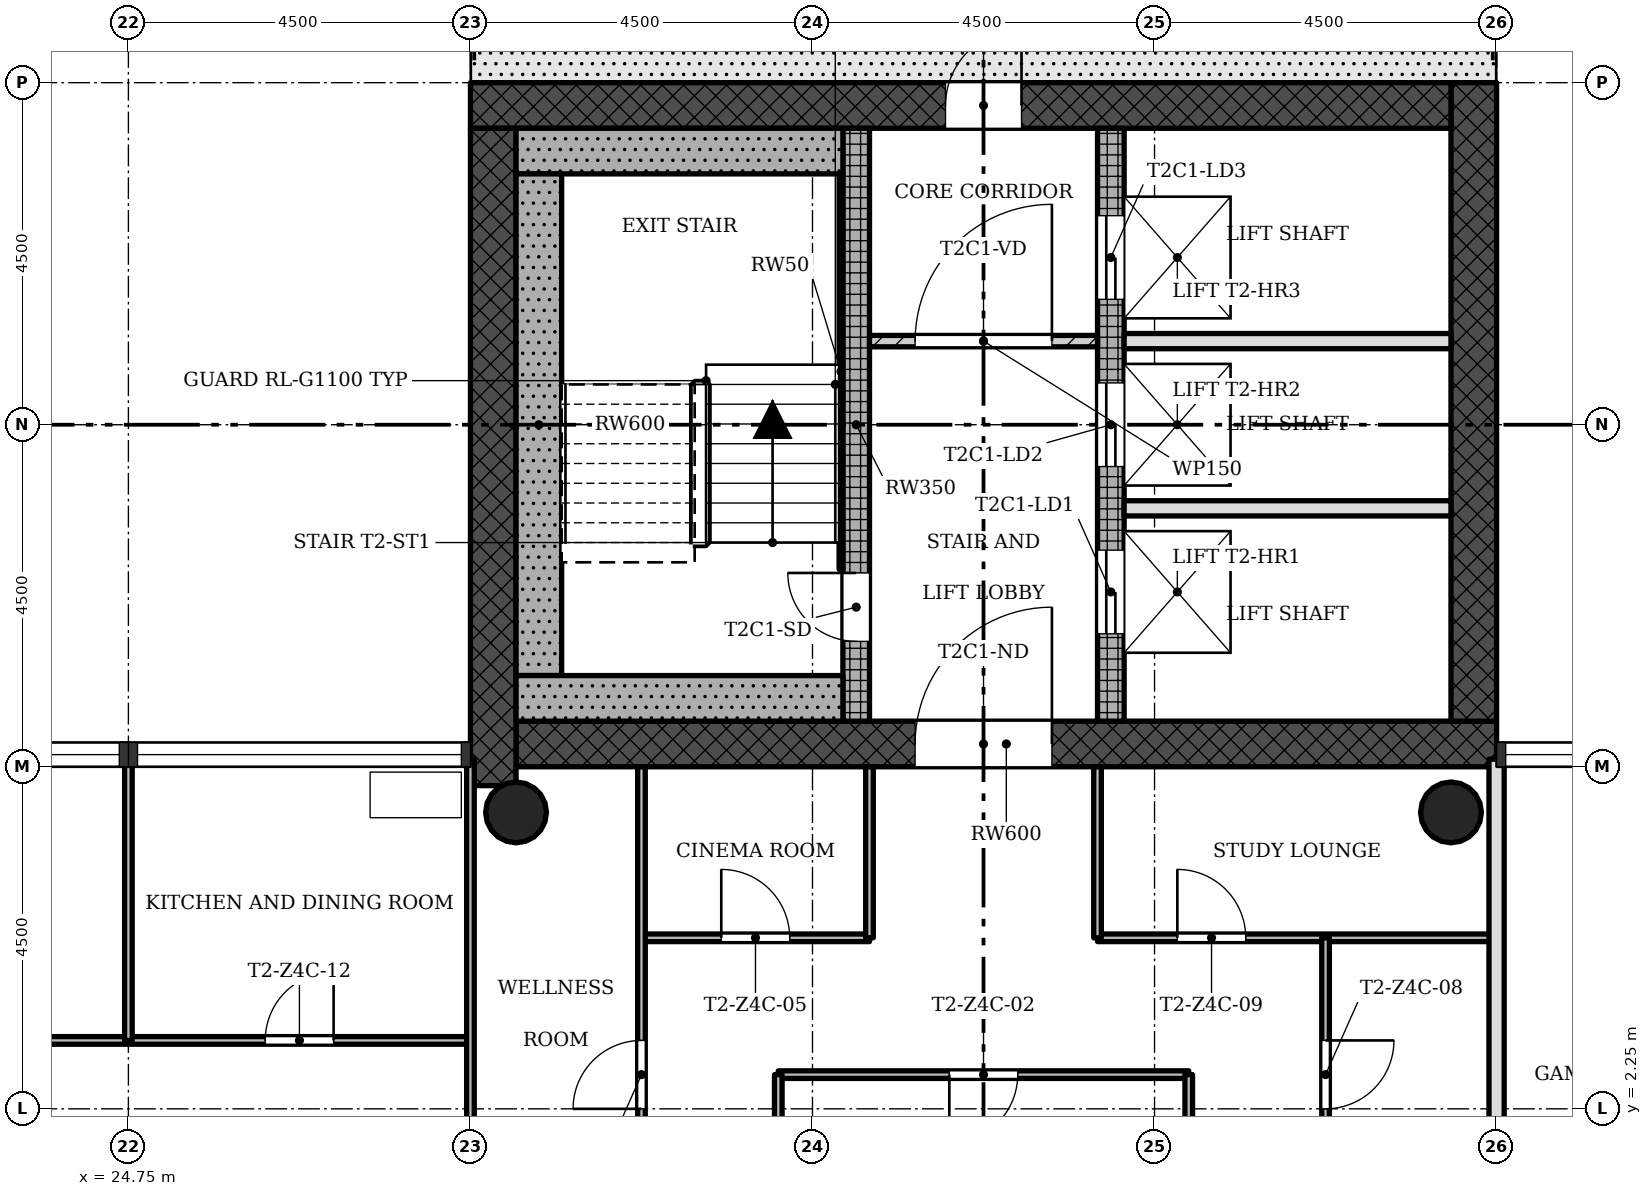
"""IFC4 building model, lengths in metres.
Left out: names, types, materials, properties, quantities, classifications, styles, units other than length and angle.
Written with IfcOpenShell. Run it as: python <this file> out.ifc"""

import sys

from ifc_helpers import new_model, si_unit, direction, frame, frame_2d, origin, origin_2d, place, context, subcontext, project, spatial, rectangle, hollow_circle, extrude, element, fill, save


model = new_model("IFC4")
c1 = context("Model", 3, precision=1e-05, world=origin(), true_north=direction((0.0, 1.0)))
c2 = subcontext(c1, "Body", "Model", "MODEL_VIEW")
j1 = project(units=[si_unit("LENGTHUNIT", "METRE"), si_unit("PLANEANGLEUNIT", "RADIAN")], contexts=[c1])
p1 = place(None, origin())
s1 = spatial("IfcSite", under=j1, at=p1, CompositionType="ELEMENT")
p2 = place(p1, origin())
s2 = spatial("IfcBuilding", under=s1, at=p2, CompositionType="ELEMENT")
p3 = place(p2, frame((0.0, 0.0, 185.8)))
s3 = spatial("IfcBuildingStorey", under=s2, at=p3, CompositionType="ELEMENT", Elevation=185.8)
p4 = place(p3, frame((29.85, 7.05, 0.0), z_axis=(0.0, 0.0, 1.0), x_axis=(1.0, 0.0, 0.0)))
e1 = element("IfcWall", 1, at=p4, inside=s3, PredefinedType="SHEAR", context=c2, shape_type="SweptSolid", body=[
    extrude(rectangle(XDim=12.9, YDim=0.6, at=frame_2d((6.45, 0.0))), origin(), (0.0, 0.0, 1.0), 3.4),
])
p5 = place(p4, frame((5.25, 0.0, 0.0)))
e2 = element("IfcOpeningElement", 2, at=p5, cuts=e1, PredefinedType="OPENING", context=c2, shape_type="SweptSolid", body=[
    extrude(rectangle(XDim=1.8, YDim=2.1, at=frame_2d((0.9, 1.05))), frame((0.0, 0.31, 0.0), z_axis=(0.0, -1.0, 0.0), x_axis=(1.0, 0.0, 0.0)), (0.0, 0.0, 1.0), 0.62),
])
p6 = place(p3, frame((42.45, 7.35, 0.0), z_axis=(0.0, 0.0, 1.0), x_axis=(0.0, 1.0, 0.0)))
e3 = element("IfcWall", 3, at=p6, inside=s3, PredefinedType="SHEAR", context=c2, shape_type="SweptSolid", body=[
    extrude(rectangle(XDim=8.4, YDim=0.6, at=frame_2d((4.2, 0.0))), origin(), (0.0, 0.0, 1.0), 3.4),
])
p7 = place(p3, frame((42.15, 15.45, 0.0), z_axis=(0.0, 0.0, 1.0), x_axis=(-1.0, 0.0, 0.0)))
e4 = element("IfcWall", 4, at=p7, inside=s3, PredefinedType="SHEAR", context=c2, shape_type="SweptSolid", body=[
    extrude(rectangle(XDim=12.9, YDim=0.6, at=frame_2d((6.45, 0.0))), origin(), (0.0, 0.0, 1.0), 3.4),
])
p8 = place(p7, frame((5.65, 0.0, 0.0)))
e5 = element("IfcOpeningElement", 5, at=p8, cuts=e4, PredefinedType="OPENING", context=c2, shape_type="SweptSolid", body=[
    extrude(rectangle(XDim=1.0, YDim=2.1, at=frame_2d((0.5, 1.05))), frame((0.0, 0.31, 0.0), z_axis=(0.0, -1.0, 0.0), x_axis=(1.0, 0.0, 0.0)), (0.0, 0.0, 1.0), 0.62),
])
p9 = place(p3, frame((29.55, 15.15, 0.0), z_axis=(0.0, 0.0, 1.0), x_axis=(0.0, -1.0, 0.0)))
e6 = element("IfcWall", 6, at=p9, inside=s3, PredefinedType="SHEAR", context=c2, shape_type="SweptSolid", body=[
    extrude(rectangle(XDim=8.648, YDim=0.6, at=frame_2d((4.324, 0.0))), origin(), (0.0, 0.0, 1.0), 3.4),
])
p10 = place(p3, frame((34.325, 7.35, 0.0), z_axis=(0.0, 0.0, 1.0), x_axis=(0.0, 1.0, 0.0)))
e7 = element("IfcWall", 7, at=p10, inside=s3, PredefinedType="SHEAR", context=c2, shape_type="SweptSolid", body=[
    extrude(rectangle(XDim=7.8, YDim=0.35, at=frame_2d((3.9, 0.0))), origin(), (0.0, 0.0, 1.0), 3.4),
])
p11 = place(p10, frame((1.05, 0.0, 0.0)))
e8 = element("IfcOpeningElement", 8, at=p11, cuts=e7, PredefinedType="OPENING", context=c2, shape_type="SweptSolid", body=[
    extrude(rectangle(XDim=0.9, YDim=2.1, at=frame_2d((0.45, 1.05))), frame((0.0, 0.185, 0.0), z_axis=(0.0, -1.0, 0.0), x_axis=(1.0, 0.0, 0.0)), (0.0, 0.0, 1.0), 0.37),
])
p12 = place(p3, frame((37.675, 7.35, 0.0), z_axis=(0.0, 0.0, 1.0), x_axis=(0.0, 1.0, 0.0)))
e9 = element("IfcWall", 9, at=p12, inside=s3, PredefinedType="SHEAR", context=c2, shape_type="SweptSolid", body=[
    extrude(rectangle(XDim=7.8, YDim=0.35, at=frame_2d((3.9, 0.0))), origin(), (0.0, 0.0, 1.0), 3.4),
])
p13 = place(p12, frame((1.15, 0.0, 0.0)))
e10 = element("IfcOpeningElement", 10, at=p13, cuts=e9, PredefinedType="OPENING", context=c2, shape_type="SweptSolid", body=[
    extrude(rectangle(XDim=1.1, YDim=2.1, at=frame_2d((0.55, 1.05))), frame((0.0, 0.185, 0.0), z_axis=(0.0, -1.0, 0.0), x_axis=(1.0, 0.0, 0.0)), (0.0, 0.0, 1.0), 0.37),
])
p14 = place(p12, frame((3.35, 0.0, 0.0)))
e11 = element("IfcOpeningElement", 11, at=p14, cuts=e9, PredefinedType="OPENING", context=c2, shape_type="SweptSolid", body=[
    extrude(rectangle(XDim=1.1, YDim=2.1, at=frame_2d((0.55, 1.05))), frame((0.0, 0.185, 0.0), z_axis=(0.0, -1.0, 0.0), x_axis=(1.0, 0.0, 0.0)), (0.0, 0.0, 1.0), 0.37),
])
p15 = place(p12, frame((5.55, 0.0, 0.0)))
e12 = element("IfcOpeningElement", 12, at=p15, cuts=e9, PredefinedType="OPENING", context=c2, shape_type="SweptSolid", body=[
    extrude(rectangle(XDim=1.1, YDim=2.1, at=frame_2d((0.55, 1.05))), frame((0.0, 0.185, 0.0), z_axis=(0.0, -1.0, 0.0), x_axis=(1.0, 0.0, 0.0)), (0.0, 0.0, 1.0), 0.37),
])
for number, where, z_axis, x_axis in (
    (13, (42.15, 6.15, 0.0), (0.0, 0.0, 1.0), (1.0, 0.0, 0.0)),
    (14, (29.85, 6.15, 0.0), (0.0, 0.0, 1.0), (1.0, 0.0, 0.0)),
):
    element("IfcColumn", number, at=place(p3, frame(where, z_axis=z_axis, x_axis=x_axis)), inside=s3, PredefinedType="COLUMN", context=c2, shape_type="SweptSolid", body=[
        extrude(hollow_circle(Radius=0.4, WallThickness=0.028, at=origin_2d()), origin(), (0.0, 0.0, 1.0), 3.4),
    ])
p16 = place(p3, frame((37.5, 12.35, 0.0), z_axis=(0.0, 0.0, 1.0), x_axis=(-1.0, 0.0, 0.0)))
e15 = element("IfcWall", 15, at=p16, inside=s3, PredefinedType="PARTITIONING", context=c2, shape_type="SweptSolid", body=[
    extrude(rectangle(XDim=3.0, YDim=0.15, at=frame_2d((1.5, 0.0))), origin(), (0.0, 0.0, 1.0), 3.0),
])
p17 = place(p16, frame((0.6, 0.0, 0.0)))
e16 = element("IfcOpeningElement", 16, at=p17, cuts=e15, PredefinedType="OPENING", context=c2, shape_type="SweptSolid", body=[
    extrude(rectangle(XDim=1.8, YDim=2.1, at=frame_2d((0.9, 1.05))), frame((0.0, 0.085, 0.0), z_axis=(0.0, -1.0, 0.0), x_axis=(1.0, 0.0, 0.0)), (0.0, 0.0, 1.0), 0.17),
])
for number, where, z_axis, x_axis in (
    (17, (42.15, 10.15, 0.0), (0.0, 0.0, 1.0), (-1.0, 0.0, 0.0)),
    (18, (42.15, 12.35, 0.0), (0.0, 0.0, 1.0), (-1.0, 0.0, 0.0)),
):
    element("IfcWall", number, at=place(p3, frame(where, z_axis=z_axis, x_axis=x_axis)), inside=s3, PredefinedType="SOLIDWALL", context=c2, shape_type="SweptSolid", body=[
        extrude(rectangle(XDim=4.3, YDim=0.2, at=frame_2d((2.15, 0.0))), origin(), (0.0, 0.0, 1.0), 3.0),
    ])
p18 = place(p3, frame((38.7, 2.7, 0.0), z_axis=(0.0, 0.0, 1.0), x_axis=(-1.0, 0.0, 0.0)))
e19 = element("IfcWall", 19, at=p18, inside=s3, PredefinedType="PARTITIONING", context=c2, shape_type="SweptSolid", body=[
    extrude(rectangle(XDim=5.4, YDim=0.1, at=frame_2d((2.7, 0.0))), origin(), (0.0, 0.0, 1.0), 3.0),
])
p19 = place(p18, frame((2.25, 0.0, 0.0)))
e20 = element("IfcOpeningElement", 20, at=p19, cuts=e19, PredefinedType="OPENING", context=c2, shape_type="SweptSolid", body=[
    extrude(rectangle(XDim=0.9, YDim=2.1, at=frame_2d((0.45, 1.05))), frame((0.0, 0.06, 0.0), z_axis=(0.0, -1.0, 0.0), x_axis=(1.0, 0.0, 0.0)), (0.0, 0.0, 1.0), 0.12),
])
p20 = place(p3, frame((29.25, 3.15, 0.0), z_axis=(0.0, 0.0, 1.0), x_axis=(-1.0, 0.0, 0.0)))
e21 = element("IfcWall", 21, at=p20, inside=s3, PredefinedType="PARTITIONING", context=c2, shape_type="SweptSolid", body=[
    extrude(rectangle(XDim=9.0, YDim=0.1, at=frame_2d((4.5, 0.0))), origin(), (0.0, 0.0, 1.0), 3.0),
])
p21 = place(p20, frame((1.8, 0.0, 0.0)))
e22 = element("IfcOpeningElement", 22, at=p21, cuts=e21, PredefinedType="OPENING", context=c2, shape_type="SweptSolid", body=[
    extrude(rectangle(XDim=0.9, YDim=2.1, at=frame_2d((0.45, 1.05))), frame((0.0, 0.06, 0.0), z_axis=(0.0, -1.0, 0.0), x_axis=(1.0, 0.0, 0.0)), (0.0, 0.0, 1.0), 0.12),
])
p22 = place(p20, frame((6.3, 0.0, 0.0)))
e23 = element("IfcOpeningElement", 23, at=p22, cuts=e21, PredefinedType="OPENING", context=c2, shape_type="SweptSolid", body=[
    extrude(rectangle(XDim=0.9, YDim=2.1, at=frame_2d((0.45, 1.05))), frame((0.0, 0.06, 0.0), z_axis=(0.0, -1.0, 0.0), x_axis=(1.0, 0.0, 0.0)), (0.0, 0.0, 1.0), 0.12),
])
p23 = place(p3, frame((42.75, 4.5, 0.0), z_axis=(0.0, 0.0, 1.0), x_axis=(-1.0, 0.0, 0.0)))
e24 = element("IfcWall", 24, at=p23, inside=s3, PredefinedType="PARTITIONING", context=c2, shape_type="SweptSolid", body=[
    extrude(rectangle(XDim=5.25, YDim=0.1, at=frame_2d((2.625, 0.0))), origin(), (0.0, 0.0, 1.0), 3.0),
])
p24 = place(p23, frame((3.3, 0.0, 0.0)))
e25 = element("IfcOpeningElement", 25, at=p24, cuts=e24, PredefinedType="OPENING", context=c2, shape_type="SweptSolid", body=[
    extrude(rectangle(XDim=0.9, YDim=2.1, at=frame_2d((0.45, 1.05))), frame((0.0, 0.06, 0.0), z_axis=(0.0, -1.0, 0.0), x_axis=(1.0, 0.0, 0.0)), (0.0, 0.0, 1.0), 0.12),
])
p25 = place(p3, frame((34.5, 4.5, 0.0), z_axis=(0.0, 0.0, 1.0), x_axis=(-1.0, 0.0, 0.0)))
e26 = element("IfcWall", 26, at=p25, inside=s3, PredefinedType="PARTITIONING", context=c2, shape_type="SweptSolid", body=[
    extrude(rectangle(XDim=3.0, YDim=0.1, at=frame_2d((1.5, 0.0))), origin(), (0.0, 0.0, 1.0), 3.0),
])
p26 = place(p25, frame((1.05, 0.0, 0.0)))
e27 = element("IfcOpeningElement", 27, at=p26, cuts=e26, PredefinedType="OPENING", context=c2, shape_type="SweptSolid", body=[
    extrude(rectangle(XDim=0.9, YDim=2.1, at=frame_2d((0.45, 1.05))), frame((0.0, 0.06, 0.0), z_axis=(0.0, -1.0, 0.0), x_axis=(1.0, 0.0, 0.0)), (0.0, 0.0, 1.0), 0.12),
])
p27 = place(p3, frame((42.75, -6.85, 0.0), z_axis=(0.0, 0.0, 1.0), x_axis=(0.0, 1.0, 0.0)))
e28 = element("IfcWall", 28, at=p27, inside=s3, PredefinedType="SOLIDWALL", context=c2, shape_type="SweptSolid", body=[
    extrude(rectangle(XDim=13.7, YDim=0.2, at=frame_2d((6.85, 0.0))), origin(), (0.0, 0.0, 1.0), 3.0),
])
p28 = place(p27, frame((6.4, 0.0, 0.0)))
e29 = element("IfcOpeningElement", 29, at=p28, cuts=e28, PredefinedType="OPENING", context=c2, shape_type="SweptSolid", body=[
    extrude(rectangle(XDim=0.9, YDim=2.1, at=frame_2d((0.45, 1.05))), frame((0.0, 0.11, 0.0), z_axis=(0.0, -1.0, 0.0), x_axis=(1.0, 0.0, 0.0)), (0.0, 0.0, 1.0), 0.22),
])
p29 = place(p3, frame((40.5, 0.9, 0.0), z_axis=(0.0, 0.0, 1.0), x_axis=(0.0, 1.0, 0.0)))
e30 = element("IfcWall", 30, at=p29, inside=s3, PredefinedType="PARTITIONING", context=c2, shape_type="SweptSolid", body=[
    extrude(rectangle(XDim=3.6, YDim=0.1, at=frame_2d((1.8, 0.0))), origin(), (0.0, 0.0, 1.0), 3.0),
])
p30 = place(p29, frame((1.35, 0.0, 0.0)))
e31 = element("IfcOpeningElement", 31, at=p30, cuts=e30, PredefinedType="OPENING", context=c2, shape_type="SweptSolid", body=[
    extrude(rectangle(XDim=0.9, YDim=2.1, at=frame_2d((0.45, 1.05))), frame((0.0, 0.06, 0.0), z_axis=(0.0, -1.0, 0.0), x_axis=(1.0, 0.0, 0.0)), (0.0, 0.0, 1.0), 0.12),
])
p31 = place(p3, frame((38.7, -2.7, 0.0), z_axis=(0.0, 0.0, 1.0), x_axis=(0.0, 1.0, 0.0)))
e32 = element("IfcWall", 32, at=p31, inside=s3, PredefinedType="PARTITIONING", context=c2, shape_type="SweptSolid", body=[
    extrude(rectangle(XDim=5.4, YDim=0.1, at=frame_2d((2.7, 0.0))), origin(), (0.0, 0.0, 1.0), 3.0),
])
for number, where, z_axis, x_axis in (
    (33, (37.5, 4.5, 0.0), (0.0, 0.0, 1.0), (0.0, 1.0, 0.0)),
    (34, (34.5, 4.5, 0.0), (0.0, 0.0, 1.0), (0.0, 1.0, 0.0)),
):
    element("IfcWall", number, at=place(p3, frame(where, z_axis=z_axis, x_axis=x_axis)), inside=s3, PredefinedType="PARTITIONING", context=c2, shape_type="SweptSolid", body=[
        extrude(rectangle(XDim=2.25, YDim=0.1, at=frame_2d((1.125, 0.0))), origin(), (0.0, 0.0, 1.0), 3.0),
    ])
p32 = place(p3, frame((33.3, -2.7, 0.0), z_axis=(0.0, 0.0, 1.0), x_axis=(0.0, 1.0, 0.0)))
e35 = element("IfcWall", 35, at=p32, inside=s3, PredefinedType="PARTITIONING", context=c2, shape_type="SweptSolid", body=[
    extrude(rectangle(XDim=5.4, YDim=0.1, at=frame_2d((2.7, 0.0))), origin(), (0.0, 0.0, 1.0), 3.0),
])
p33 = place(p32, frame((2.25, 0.0, 0.0)))
e36 = element("IfcOpeningElement", 36, at=p33, cuts=e35, PredefinedType="OPENING", context=c2, shape_type="SweptSolid", body=[
    extrude(rectangle(XDim=0.9, YDim=2.1, at=frame_2d((0.45, 1.05))), frame((0.0, 0.06, 0.0), z_axis=(0.0, -1.0, 0.0), x_axis=(1.0, 0.0, 0.0)), (0.0, 0.0, 1.0), 0.12),
])
p34 = place(p3, frame((31.5, 0.9, 0.0), z_axis=(0.0, 0.0, 1.0), x_axis=(0.0, 1.0, 0.0)))
e37 = element("IfcWall", 37, at=p34, inside=s3, PredefinedType="PARTITIONING", context=c2, shape_type="SweptSolid", body=[
    extrude(rectangle(XDim=5.85, YDim=0.1, at=frame_2d((2.925, 0.0))), origin(), (0.0, 0.0, 1.0), 3.0),
])
p35 = place(p34, frame((1.35, 0.0, 0.0)))
e38 = element("IfcOpeningElement", 38, at=p35, cuts=e37, PredefinedType="OPENING", context=c2, shape_type="SweptSolid", body=[
    extrude(rectangle(XDim=0.9, YDim=2.1, at=frame_2d((0.45, 1.05))), frame((0.0, 0.06, 0.0), z_axis=(0.0, -1.0, 0.0), x_axis=(1.0, 0.0, 0.0)), (0.0, 0.0, 1.0), 0.12),
])
p36 = place(p3, frame((29.25, 0.9, 0.0), z_axis=(0.0, 0.0, 1.0), x_axis=(0.0, 1.0, 0.0)))
e39 = element("IfcWall", 39, at=p36, inside=s3, PredefinedType="PARTITIONING", context=c2, shape_type="SweptSolid", body=[
    extrude(rectangle(XDim=5.95, YDim=0.1, at=frame_2d((2.975, 0.0))), origin(), (0.0, 0.0, 1.0), 3.0),
])
p37 = place(p3, frame((24.75, 3.15, 0.0), z_axis=(0.0, 0.0, 1.0), x_axis=(0.0, 1.0, 0.0)))
e40 = element("IfcWall", 40, at=p37, inside=s3, PredefinedType="PARTITIONING", context=c2, shape_type="SweptSolid", body=[
    extrude(rectangle(XDim=3.7, YDim=0.1, at=frame_2d((1.85, 0.0))), origin(), (0.0, 0.0, 1.0), 3.0),
])
p38 = place(p3, frame((34.15, 14.85, 0.0), z_axis=(0.0, 0.0, 1.0), x_axis=(-1.0, 0.0, 0.0)))
e41 = element("IfcWall", 41, at=p38, inside=s3, PredefinedType="SHEAR", context=c2, shape_type="SweptSolid", body=[
    extrude(rectangle(XDim=4.3, YDim=0.6, at=frame_2d((2.15, 0.0))), origin(), (0.0, 0.0, 1.0), 3.4),
])
p39 = place(p3, frame((30.15, 7.95, 0.0), z_axis=(0.0, 0.0, 1.0), x_axis=(0.0, 1.0, 0.0)))
e42 = element("IfcWall", 42, at=p39, inside=s3, PredefinedType="SHEAR", context=c2, shape_type="SweptSolid", body=[
    extrude(rectangle(XDim=6.6, YDim=0.6, at=frame_2d((3.3, 0.0))), origin(), (0.0, 0.0, 1.0), 3.4),
])
p40 = place(p3, frame((34.15, 7.65, 0.0), z_axis=(0.0, 0.0, 1.0), x_axis=(-1.0, 0.0, 0.0)))
e43 = element("IfcWall", 43, at=p40, inside=s3, PredefinedType="SHEAR", context=c2, shape_type="SweptSolid", body=[
    extrude(rectangle(XDim=4.3, YDim=0.6, at=frame_2d((2.15, 0.0))), origin(), (0.0, 0.0, 1.0), 3.4),
])
p41 = place(p3, frame((34.125, 9.35, 0.0), z_axis=(0.0, 0.0, 1.0), x_axis=(0.0, 1.0, 0.0)))
e44 = element("IfcWall", 44, at=p41, inside=s3, PredefinedType="SHEAR", context=c2, shape_type="SweptSolid", body=[
    extrude(rectangle(XDim=5.2, YDim=0.05, at=frame_2d((2.6, 0.0))), origin(), (0.0, 0.0, 1.0), 3.4),
])
p42 = place(p8, origin())
e45 = element("IfcDoor", 45, at=p42, inside=s3, OperationType="SINGLE_SWING_LEFT", PredefinedType="DOOR", context=c2, shape_type="SweptSolid", body=[
    extrude(rectangle(XDim=1.0, YDim=2.1, at=frame_2d((0.5, 1.05))), frame((0.0, 0.025, 0.0), z_axis=(0.0, -1.0, 0.0), x_axis=(1.0, 0.0, 0.0)), (0.0, 0.0, 1.0), 0.05),
])
fill(e5, e45)
p43 = place(p17, origin())
e46 = element("IfcDoor", 46, at=p43, inside=s3, OperationType="SINGLE_SWING_LEFT", PredefinedType="DOOR", context=c2, shape_type="SweptSolid", body=[
    extrude(rectangle(XDim=1.8, YDim=2.1, at=frame_2d((0.9, 1.05))), frame((0.0, 0.025, 0.0), z_axis=(0.0, -1.0, 0.0), x_axis=(1.0, 0.0, 0.0)), (0.0, 0.0, 1.0), 0.05),
])
fill(e16, e46)
p44 = place(p19, origin())
e47 = element("IfcDoor", 47, at=p44, inside=s3, OperationType="SINGLE_SWING_LEFT", PredefinedType="DOOR", context=c2, shape_type="SweptSolid", body=[
    extrude(rectangle(XDim=0.9, YDim=2.1, at=frame_2d((0.45, 1.05))), frame((0.0, 0.025, 0.0), z_axis=(0.0, -1.0, 0.0), x_axis=(1.0, 0.0, 0.0)), (0.0, 0.0, 1.0), 0.05),
])
fill(e20, e47)
p45 = place(p35, origin())
e48 = element("IfcDoor", 48, at=p45, inside=s3, OperationType="SINGLE_SWING_RIGHT", PredefinedType="DOOR", context=c2, shape_type="SweptSolid", body=[
    extrude(rectangle(XDim=0.9, YDim=2.1, at=frame_2d((0.45, 1.05))), frame((0.0, 0.025, 0.0), z_axis=(0.0, -1.0, 0.0), x_axis=(1.0, 0.0, 0.0)), (0.0, 0.0, 1.0), 0.05),
])
fill(e38, e48)
p46 = place(p26, origin())
e49 = element("IfcDoor", 49, at=p46, inside=s3, OperationType="SINGLE_SWING_RIGHT", PredefinedType="DOOR", context=c2, shape_type="SweptSolid", body=[
    extrude(rectangle(XDim=0.9, YDim=2.1, at=frame_2d((0.45, 1.05))), frame((0.0, 0.025, 0.0), z_axis=(0.0, -1.0, 0.0), x_axis=(1.0, 0.0, 0.0)), (0.0, 0.0, 1.0), 0.05),
])
fill(e27, e49)
p47 = place(p30, origin())
e50 = element("IfcDoor", 50, at=p47, inside=s3, OperationType="SINGLE_SWING_RIGHT", PredefinedType="DOOR", context=c2, shape_type="SweptSolid", body=[
    extrude(rectangle(XDim=0.9, YDim=2.1, at=frame_2d((0.45, 1.05))), frame((0.0, 0.025, 0.0), z_axis=(0.0, -1.0, 0.0), x_axis=(1.0, 0.0, 0.0)), (0.0, 0.0, 1.0), 0.05),
])
fill(e31, e50)
p48 = place(p24, origin())
e51 = element("IfcDoor", 51, at=p48, inside=s3, OperationType="SINGLE_SWING_RIGHT", PredefinedType="DOOR", context=c2, shape_type="SweptSolid", body=[
    extrude(rectangle(XDim=0.9, YDim=2.1, at=frame_2d((0.45, 1.05))), frame((0.0, 0.025, 0.0), z_axis=(0.0, -1.0, 0.0), x_axis=(1.0, 0.0, 0.0)), (0.0, 0.0, 1.0), 0.05),
])
fill(e25, e51)
p49 = place(p21, origin())
e52 = element("IfcDoor", 52, at=p49, inside=s3, OperationType="SINGLE_SWING_LEFT", PredefinedType="DOOR", context=c2, shape_type="SweptSolid", body=[
    extrude(rectangle(XDim=0.9, YDim=2.1, at=frame_2d((0.45, 1.05))), frame((0.0, 0.025, 0.0), z_axis=(0.0, -1.0, 0.0), x_axis=(1.0, 0.0, 0.0)), (0.0, 0.0, 1.0), 0.05),
])
fill(e22, e52)
p50 = place(p11, origin())
e53 = element("IfcDoor", 53, at=p50, inside=s3, OperationType="SINGLE_SWING_LEFT", PredefinedType="DOOR", context=c2, shape_type="SweptSolid", body=[
    extrude(rectangle(XDim=0.9, YDim=2.1, at=frame_2d((0.45, 1.05))), frame((0.0, 0.025, 0.0), z_axis=(0.0, -1.0, 0.0), x_axis=(1.0, 0.0, 0.0)), (0.0, 0.0, 1.0), 0.05),
])
fill(e8, e53)
p51 = place(p13, origin())
e54 = element("IfcDoor", 54, at=p51, inside=s3, OperationType="SLIDING_TO_LEFT", PredefinedType="DOOR", context=c2, shape_type="SweptSolid", body=[
    extrude(rectangle(XDim=1.1, YDim=2.1, at=frame_2d((0.55, 1.05))), frame((0.0, 0.025, 0.0), z_axis=(0.0, -1.0, 0.0), x_axis=(1.0, 0.0, 0.0)), (0.0, 0.0, 1.0), 0.05),
])
fill(e10, e54)
p52 = place(p14, origin())
e55 = element("IfcDoor", 55, at=p52, inside=s3, OperationType="SLIDING_TO_LEFT", PredefinedType="DOOR", context=c2, shape_type="SweptSolid", body=[
    extrude(rectangle(XDim=1.1, YDim=2.1, at=frame_2d((0.55, 1.05))), frame((0.0, 0.025, 0.0), z_axis=(0.0, -1.0, 0.0), x_axis=(1.0, 0.0, 0.0)), (0.0, 0.0, 1.0), 0.05),
])
fill(e11, e55)
p53 = place(p15, origin())
e56 = element("IfcDoor", 56, at=p53, inside=s3, OperationType="SLIDING_TO_LEFT", PredefinedType="DOOR", context=c2, shape_type="SweptSolid", body=[
    extrude(rectangle(XDim=1.1, YDim=2.1, at=frame_2d((0.55, 1.05))), frame((0.0, 0.025, 0.0), z_axis=(0.0, -1.0, 0.0), x_axis=(1.0, 0.0, 0.0)), (0.0, 0.0, 1.0), 0.05),
])
fill(e12, e56)
p54 = place(p5, origin())
e57 = element("IfcDoor", 57, at=p54, inside=s3, OperationType="SINGLE_SWING_LEFT", PredefinedType="DOOR", context=c2, shape_type="SweptSolid", body=[
    extrude(rectangle(XDim=1.8, YDim=2.1, at=frame_2d((0.9, 1.05))), frame((0.0, 0.025, 0.0), z_axis=(0.0, -1.0, 0.0), x_axis=(1.0, 0.0, 0.0)), (0.0, 0.0, 1.0), 0.05),
])
fill(e2, e57)
save(model, sys.argv[1])
